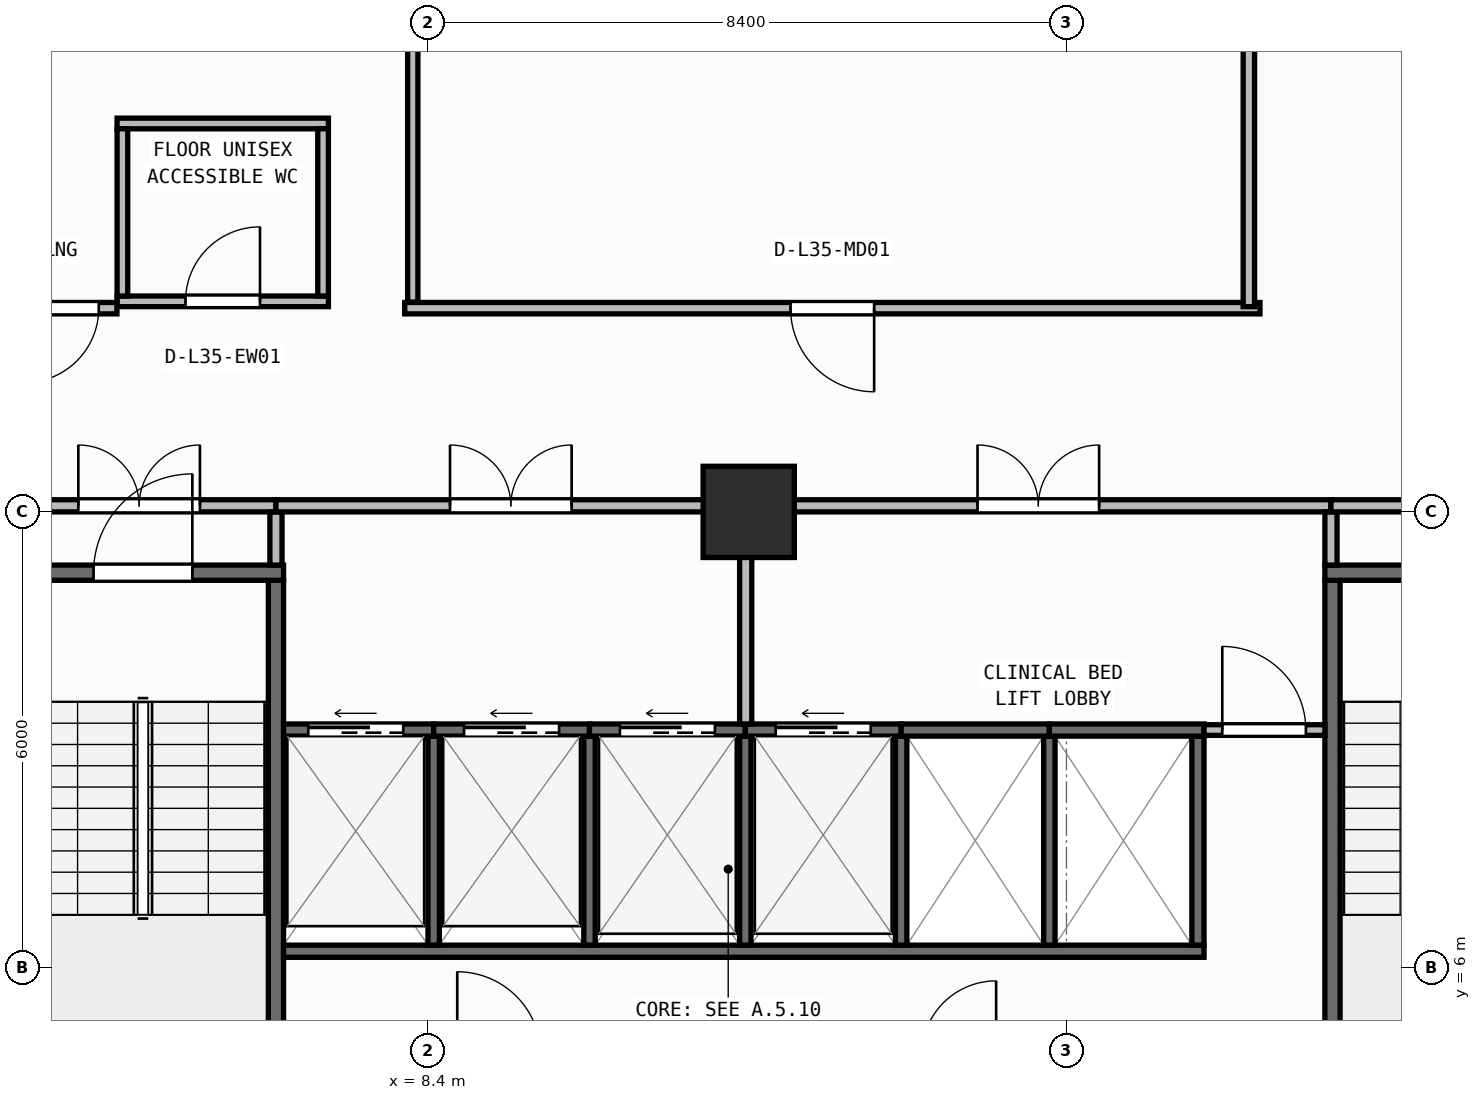
"""IFC4 building model, lengths in metres.
Left out: names, types, materials, properties, quantities, classifications, styles, units other than length and angle.
Written with IfcOpenShell. Run it as: python <this file> out.ifc"""

import sys

from ifc_helpers import new_model, si_unit, direction, frame, frame_2d, origin, origin_2d, place, context, subcontext, project, spatial, rectangle, extrude, element, fill, save


model = new_model("IFC4")
c1 = context("Model", 3, precision=1e-05, world=origin(), true_north=direction((0.0, 1.0)))
c2 = subcontext(c1, "Body", "Model", "MODEL_VIEW")
j1 = project(units=[si_unit("LENGTHUNIT", "METRE"), si_unit("PLANEANGLEUNIT", "RADIAN")], contexts=[c1])
p1 = place(None, origin())
s1 = spatial("IfcSite", under=j1, at=p1, CompositionType="ELEMENT")
p2 = place(p1, origin())
s2 = spatial("IfcBuilding", under=s1, at=p2, CompositionType="ELEMENT")
p3 = place(p2, frame((0.0, 0.0, 142.85)))
s3 = spatial("IfcBuildingStorey", under=s2, at=p3, CompositionType="ELEMENT", Elevation=142.85)
p4 = place(p3, frame((12.62, 12.0, 0.0), z_axis=(0.0, 0.0, 1.0), x_axis=(1.0, 0.0, 0.0)))
e1 = element("IfcColumn", 1, at=p4, inside=s3, PredefinedType="COLUMN", context=c2, shape_type="SweptSolid", body=[
    extrude(rectangle(XDim=1.2, YDim=1.2, at=origin_2d()), origin(), (0.0, 0.0, 1.0), 3.95),
])
p5 = place(p3, frame((6.4, 3.5, 0.0), z_axis=(0.0, 0.0, 1.0), x_axis=(0.0, 1.0, 0.0)))
e2 = element("IfcWall", 2, at=p5, inside=s3, PredefinedType="SHEAR", context=c2, shape_type="SweptSolid", body=[
    extrude(rectangle(XDim=7.6, YDim=0.2, at=frame_2d((3.8, 0.0))), origin(), (0.0, 0.0, 1.0), 3.71),
])
p6 = place(p3, frame((2.8, 11.2, 0.0), z_axis=(0.0, 0.0, 1.0), x_axis=(1.0, 0.0, 0.0)))
e3 = element("IfcWall", 3, at=p6, inside=s3, PredefinedType="SHEAR", context=c2, shape_type="SweptSolid", body=[
    extrude(rectangle(XDim=3.7, YDim=0.2, at=frame_2d((1.85, 0.0))), origin(), (0.0, 0.0, 1.0), 3.71),
])
p7 = place(p6, frame((1.2, 0.0, 0.0)))
e4 = element("IfcOpeningElement", 4, at=p7, cuts=e3, PredefinedType="OPENING", context=c2, shape_type="SweptSolid", body=[
    extrude(rectangle(XDim=1.3, YDim=2.15, at=frame_2d((0.65, 1.075))), frame((0.0, 0.11, 0.0), z_axis=(0.0, -1.0, 0.0), x_axis=(1.0, 0.0, 0.0)), (0.0, 0.0, 1.0), 0.22),
])
p8 = place(p3, frame((20.3, 3.5, 0.0), z_axis=(0.0, 0.0, 1.0), x_axis=(0.0, 1.0, 0.0)))
e5 = element("IfcWall", 5, at=p8, inside=s3, PredefinedType="SHEAR", context=c2, shape_type="SweptSolid", body=[
    extrude(rectangle(XDim=7.6, YDim=0.2, at=frame_2d((3.8, 0.0))), origin(), (0.0, 0.0, 1.0), 3.71),
])
p9 = place(p3, frame((20.2, 11.2, 0.0), z_axis=(0.0, 0.0, 1.0), x_axis=(1.0, 0.0, 0.0)))
e6 = element("IfcWall", 6, at=p9, inside=s3, PredefinedType="SHEAR", context=c2, shape_type="SweptSolid", body=[
    extrude(rectangle(XDim=3.7, YDim=0.2, at=frame_2d((1.85, 0.0))), origin(), (0.0, 0.0, 1.0), 3.71),
])
p10 = place(p9, frame((1.2, 0.0, 0.0)))
e7 = element("IfcOpeningElement", 7, at=p10, cuts=e6, PredefinedType="OPENING", context=c2, shape_type="SweptSolid", body=[
    extrude(rectangle(XDim=1.3, YDim=2.15, at=frame_2d((0.65, 1.075))), frame((0.0, 0.11, 0.0), z_axis=(0.0, -1.0, 0.0), x_axis=(1.0, 0.0, 0.0)), (0.0, 0.0, 1.0), 0.22),
])
p11 = place(p3, frame((6.5, 6.22, 0.0), z_axis=(0.0, 0.0, 1.0), x_axis=(1.0, 0.0, 0.0)))
e8 = element("IfcWall", 8, at=p11, inside=s3, PredefinedType="SHEAR", context=c2, shape_type="SweptSolid", body=[
    extrude(rectangle(XDim=12.11, YDim=0.16, at=frame_2d((6.055, 0.0))), origin(), (0.0, 0.0, 1.0), 3.71),
])
p12 = place(p3, frame((18.53, 6.3, 0.0), z_axis=(0.0, 0.0, 1.0), x_axis=(0.0, 1.0, 0.0)))
e9 = element("IfcWall", 9, at=p12, inside=s3, PredefinedType="SHEAR", context=c2, shape_type="SweptSolid", body=[
    extrude(rectangle(XDim=2.75, YDim=0.16, at=frame_2d((1.375, 0.0))), origin(), (0.0, 0.0, 1.0), 3.71),
])
for number, where, z_axis, x_axis in (
    (10, (8.475, 6.3, 0.0), (0.0, 0.0, 1.0), (0.0, 1.0, 0.0)),
    (11, (10.525, 6.3, 0.0), (0.0, 0.0, 1.0), (0.0, 1.0, 0.0)),
    (12, (12.575, 6.3, 0.0), (0.0, 0.0, 1.0), (0.0, 1.0, 0.0)),
    (13, (14.625, 6.3, 0.0), (0.0, 0.0, 1.0), (0.0, 1.0, 0.0)),
    (14, (16.575, 6.3, 0.0), (0.0, 0.0, 1.0), (0.0, 1.0, 0.0)),
):
    element("IfcWall", number, at=place(p3, frame(where, z_axis=z_axis, x_axis=x_axis)), inside=s3, PredefinedType="SHEAR", context=c2, shape_type="SweptSolid", body=[
        extrude(rectangle(XDim=2.75, YDim=0.15, at=frame_2d((1.375, 0.0))), origin(), (0.0, 0.0, 1.0), 3.71),
    ])
p13 = place(p3, frame((6.5, 9.13, 0.0), z_axis=(0.0, 0.0, 1.0), x_axis=(1.0, 0.0, 0.0)))
e15 = element("IfcWall", 15, at=p13, inside=s3, PredefinedType="SHEAR", context=c2, shape_type="SweptSolid", body=[
    extrude(rectangle(XDim=1.975, YDim=0.16, at=frame_2d((0.988, 0.0))), origin(), (0.0, 0.0, 1.0), 3.71),
])
p14 = place(p13, frame((0.325, 0.0, 0.0)))
e16 = element("IfcOpeningElement", 16, at=p14, cuts=e15, PredefinedType="OPENING", context=c2, shape_type="SweptSolid", body=[
    extrude(rectangle(XDim=1.25, YDim=2.15, at=frame_2d((0.625, 1.075))), frame((0.0, 0.09, 0.0), z_axis=(0.0, -1.0, 0.0), x_axis=(1.0, 0.0, 0.0)), (0.0, 0.0, 1.0), 0.18),
])
p15 = place(p3, frame((8.475, 9.13, 0.0), z_axis=(0.0, 0.0, 1.0), x_axis=(1.0, 0.0, 0.0)))
e17 = element("IfcWall", 17, at=p15, inside=s3, PredefinedType="SHEAR", context=c2, shape_type="SweptSolid", body=[
    extrude(rectangle(XDim=2.05, YDim=0.16, at=frame_2d((1.025, 0.0))), origin(), (0.0, 0.0, 1.0), 3.71),
])
p16 = place(p15, frame((0.4, 0.0, 0.0)))
e18 = element("IfcOpeningElement", 18, at=p16, cuts=e17, PredefinedType="OPENING", context=c2, shape_type="SweptSolid", body=[
    extrude(rectangle(XDim=1.25, YDim=2.15, at=frame_2d((0.625, 1.075))), frame((0.0, 0.09, 0.0), z_axis=(0.0, -1.0, 0.0), x_axis=(1.0, 0.0, 0.0)), (0.0, 0.0, 1.0), 0.18),
])
p17 = place(p3, frame((10.525, 9.13, 0.0), z_axis=(0.0, 0.0, 1.0), x_axis=(1.0, 0.0, 0.0)))
e19 = element("IfcWall", 19, at=p17, inside=s3, PredefinedType="SHEAR", context=c2, shape_type="SweptSolid", body=[
    extrude(rectangle(XDim=2.05, YDim=0.16, at=frame_2d((1.025, 0.0))), origin(), (0.0, 0.0, 1.0), 3.71),
])
p18 = place(p17, frame((0.4, 0.0, 0.0)))
e20 = element("IfcOpeningElement", 20, at=p18, cuts=e19, PredefinedType="OPENING", context=c2, shape_type="SweptSolid", body=[
    extrude(rectangle(XDim=1.25, YDim=2.15, at=frame_2d((0.625, 1.075))), frame((0.0, 0.09, 0.0), z_axis=(0.0, -1.0, 0.0), x_axis=(1.0, 0.0, 0.0)), (0.0, 0.0, 1.0), 0.18),
])
p19 = place(p3, frame((12.575, 9.13, 0.0), z_axis=(0.0, 0.0, 1.0), x_axis=(1.0, 0.0, 0.0)))
e21 = element("IfcWall", 21, at=p19, inside=s3, PredefinedType="SHEAR", context=c2, shape_type="SweptSolid", body=[
    extrude(rectangle(XDim=2.05, YDim=0.16, at=frame_2d((1.025, 0.0))), origin(), (0.0, 0.0, 1.0), 3.71),
])
p20 = place(p19, frame((0.4, 0.0, 0.0)))
e22 = element("IfcOpeningElement", 22, at=p20, cuts=e21, PredefinedType="OPENING", context=c2, shape_type="SweptSolid", body=[
    extrude(rectangle(XDim=1.25, YDim=2.15, at=frame_2d((0.625, 1.075))), frame((0.0, 0.09, 0.0), z_axis=(0.0, -1.0, 0.0), x_axis=(1.0, 0.0, 0.0)), (0.0, 0.0, 1.0), 0.18),
])
p21 = place(p3, frame((14.625, 9.13, 0.0), z_axis=(0.0, 0.0, 1.0), x_axis=(1.0, 0.0, 0.0)))
e23 = element("IfcWall", 23, at=p21, inside=s3, PredefinedType="SHEAR", context=c2, shape_type="SweptSolid", body=[
    extrude(rectangle(XDim=1.95, YDim=0.16, at=frame_2d((0.975, 0.0))), origin(), (0.0, 0.0, 1.0), 3.71),
])
p22 = place(p3, frame((16.575, 9.13, 0.0), z_axis=(0.0, 0.0, 1.0), x_axis=(1.0, 0.0, 0.0)))
e24 = element("IfcWall", 24, at=p22, inside=s3, PredefinedType="SHEAR", context=c2, shape_type="SweptSolid", body=[
    extrude(rectangle(XDim=2.035, YDim=0.16, at=frame_2d((1.018, 0.0))), origin(), (0.0, 0.0, 1.0), 3.71),
])
p23 = place(p3, frame((18.61, 9.13, 0.0), z_axis=(0.0, 0.0, 1.0), x_axis=(1.0, 0.0, 0.0)))
e25 = element("IfcWall", 25, at=p23, inside=s3, PredefinedType="PARTITIONING", context=c2, shape_type="SweptSolid", body=[
    extrude(rectangle(XDim=1.59, YDim=0.14, at=frame_2d((0.795, 0.0))), origin(), (0.0, 0.0, 1.0), 3.71),
])
p24 = place(p23, frame((0.24, 0.0, 0.0)))
e26 = element("IfcOpeningElement", 26, at=p24, cuts=e25, PredefinedType="OPENING", context=c2, shape_type="SweptSolid", body=[
    extrude(rectangle(XDim=1.1, YDim=2.1, at=frame_2d((0.55, 1.05))), frame((0.0, 0.08, 0.0), z_axis=(0.0, -1.0, 0.0), x_axis=(1.0, 0.0, 0.0)), (0.0, 0.0, 1.0), 0.16),
])
p25 = place(p3, frame((2.8, 12.08, 0.0), z_axis=(0.0, 0.0, 1.0), x_axis=(1.0, 0.0, 0.0)))
e27 = element("IfcWall", 27, at=p25, inside=s3, PredefinedType="PARTITIONING", context=c2, shape_type="SweptSolid", body=[
    extrude(rectangle(XDim=3.6, YDim=0.16, at=frame_2d((1.8, 0.0))), origin(), (0.0, 0.0, 1.0), 3.083),
])
p26 = place(p25, frame((1.0, 0.0, 0.0)))
e28 = element("IfcOpeningElement", 28, at=p26, cuts=e27, PredefinedType="OPENING", context=c2, shape_type="SweptSolid", body=[
    extrude(rectangle(XDim=1.6, YDim=2.05, at=frame_2d((0.8, 1.025))), frame((0.0, 0.09, 0.0), z_axis=(0.0, -1.0, 0.0), x_axis=(1.0, 0.0, 0.0)), (0.0, 0.0, 1.0), 0.18),
])
p27 = place(p3, frame((6.4, 11.3, 0.0), z_axis=(0.0, 0.0, 1.0), x_axis=(0.0, 1.0, 0.0)))
e29 = element("IfcWall", 29, at=p27, inside=s3, PredefinedType="PARTITIONING", context=c2, shape_type="SweptSolid", body=[
    extrude(rectangle(XDim=0.7, YDim=0.16, at=frame_2d((0.35, 0.0))), origin(), (0.0, 0.0, 1.0), 3.71),
])
p28 = place(p3, frame((6.4, 12.08, 0.0), z_axis=(0.0, 0.0, 1.0), x_axis=(1.0, 0.0, 0.0)))
e30 = element("IfcWall", 30, at=p28, inside=s3, PredefinedType="PARTITIONING", context=c2, shape_type="SweptSolid", body=[
    extrude(rectangle(XDim=6.18, YDim=0.16, at=frame_2d((3.09, 0.0))), origin(), (0.0, 0.0, 1.0), 3.083),
])
p29 = place(p28, frame((2.29, 0.0, 0.0)))
e31 = element("IfcOpeningElement", 31, at=p29, cuts=e30, PredefinedType="OPENING", context=c2, shape_type="SweptSolid", body=[
    extrude(rectangle(XDim=1.6, YDim=2.05, at=frame_2d((0.8, 1.025))), frame((0.0, 0.09, 0.0), z_axis=(0.0, -1.0, 0.0), x_axis=(1.0, 0.0, 0.0)), (0.0, 0.0, 1.0), 0.18),
])
p30 = place(p3, frame((12.58, 9.21, 0.0), z_axis=(0.0, 0.0, 1.0), x_axis=(0.0, 1.0, 0.0)))
e32 = element("IfcWall", 32, at=p30, inside=s3, PredefinedType="PARTITIONING", context=c2, shape_type="SweptSolid", body=[
    extrude(rectangle(XDim=2.79, YDim=0.16, at=frame_2d((1.395, 0.0))), origin(), (0.0, 0.0, 1.0), 3.71),
])
p31 = place(p3, frame((12.58, 12.08, 0.0), z_axis=(0.0, 0.0, 1.0), x_axis=(1.0, 0.0, 0.0)))
e33 = element("IfcWall", 33, at=p31, inside=s3, PredefinedType="PARTITIONING", context=c2, shape_type="SweptSolid", body=[
    extrude(rectangle(XDim=7.7, YDim=0.16, at=frame_2d((3.85, 0.0))), origin(), (0.0, 0.0, 1.0), 3.083),
])
p32 = place(p31, frame((3.05, 0.0, 0.0)))
e34 = element("IfcOpeningElement", 34, at=p32, cuts=e33, PredefinedType="OPENING", context=c2, shape_type="SweptSolid", body=[
    extrude(rectangle(XDim=1.6, YDim=2.05, at=frame_2d((0.8, 1.025))), frame((0.0, 0.09, 0.0), z_axis=(0.0, -1.0, 0.0), x_axis=(1.0, 0.0, 0.0)), (0.0, 0.0, 1.0), 0.18),
])
p33 = place(p3, frame((20.28, 11.3, 0.0), z_axis=(0.0, 0.0, 1.0), x_axis=(0.0, 1.0, 0.0)))
e35 = element("IfcWall", 35, at=p33, inside=s3, PredefinedType="PARTITIONING", context=c2, shape_type="SweptSolid", body=[
    extrude(rectangle(XDim=0.7, YDim=0.16, at=frame_2d((0.35, 0.0))), origin(), (0.0, 0.0, 1.0), 3.71),
])
p34 = place(p3, frame((20.28, 12.08, 0.0), z_axis=(0.0, 0.0, 1.0), x_axis=(1.0, 0.0, 0.0)))
e36 = element("IfcWall", 36, at=p34, inside=s3, PredefinedType="PARTITIONING", context=c2, shape_type="SweptSolid", body=[
    extrude(rectangle(XDim=3.62, YDim=0.16, at=frame_2d((1.81, 0.0))), origin(), (0.0, 0.0, 1.0), 3.083),
])
p35 = place(p34, frame((1.01, 0.0, 0.0)))
e37 = element("IfcOpeningElement", 37, at=p35, cuts=e36, PredefinedType="OPENING", context=c2, shape_type="SweptSolid", body=[
    extrude(rectangle(XDim=1.6, YDim=2.05, at=frame_2d((0.8, 1.025))), frame((0.0, 0.09, 0.0), z_axis=(0.0, -1.0, 0.0), x_axis=(1.0, 0.0, 0.0)), (0.0, 0.0, 1.0), 0.18),
])
p36 = place(p3, frame((4.31, 14.77, 0.0), z_axis=(0.0, 0.0, 1.0), x_axis=(1.0, 0.0, 0.0)))
e38 = element("IfcWall", 38, at=p36, inside=s3, PredefinedType="PARTITIONING", context=c2, shape_type="SweptSolid", body=[
    extrude(rectangle(XDim=2.78, YDim=0.14, at=frame_2d((1.39, 0.0))), origin(), (0.0, 0.0, 1.0), 3.71),
])
p37 = place(p36, frame((0.9, 0.0, 0.0)))
e39 = element("IfcOpeningElement", 39, at=p37, cuts=e38, PredefinedType="OPENING", context=c2, shape_type="SweptSolid", body=[
    extrude(rectangle(XDim=0.98, YDim=2.1, at=frame_2d((0.49, 1.05))), frame((0.0, 0.08, 0.0), z_axis=(0.0, -1.0, 0.0), x_axis=(1.0, 0.0, 0.0)), (0.0, 0.0, 1.0), 0.16),
])
p38 = place(p3, frame((4.31, 17.11, 0.0), z_axis=(0.0, 0.0, 1.0), x_axis=(1.0, 0.0, 0.0)))
e40 = element("IfcWall", 40, at=p38, inside=s3, PredefinedType="PARTITIONING", context=c2, shape_type="SweptSolid", body=[
    extrude(rectangle(XDim=2.78, YDim=0.14, at=frame_2d((1.39, 0.0))), origin(), (0.0, 0.0, 1.0), 3.71),
])
for number, where, z_axis, x_axis in (
    (41, (4.38, 14.84, 0.0), (0.0, 0.0, 1.0), (0.0, 1.0, 0.0)),
    (42, (7.02, 14.84, 0.0), (0.0, 0.0, 1.0), (0.0, 1.0, 0.0)),
):
    element("IfcWall", number, at=place(p3, frame(where, z_axis=z_axis, x_axis=x_axis)), inside=s3, PredefinedType="PARTITIONING", context=c2, shape_type="SweptSolid", body=[
        extrude(rectangle(XDim=2.2, YDim=0.14, at=frame_2d((1.1, 0.0))), origin(), (0.0, 0.0, 1.0), 3.71),
    ])
p39 = place(p3, frame((4.308, 14.68, 0.0), z_axis=(0.0, 0.0, 1.0), x_axis=(-1.0, 0.0, 0.0)))
e43 = element("IfcWall", 43, at=p39, inside=s3, PredefinedType="PARTITIONING", context=c2, shape_type="SweptSolid", body=[
    extrude(rectangle(XDim=1.458, YDim=0.15, at=frame_2d((0.729, 0.0))), origin(), (0.0, 0.0, 1.0), 3.71),
])
p40 = place(p39, frame((0.239, 0.0, 0.0)))
e44 = element("IfcOpeningElement", 44, at=p40, cuts=e43, PredefinedType="OPENING", context=c2, shape_type="SweptSolid", body=[
    extrude(rectangle(XDim=0.98, YDim=2.1, at=frame_2d((0.49, 1.05))), frame((0.0, 0.085, 0.0), z_axis=(0.0, -1.0, 0.0), x_axis=(1.0, 0.0, 0.0)), (0.0, 0.0, 1.0), 0.17),
])
p41 = place(p3, frame((19.346, 14.68, 0.0), z_axis=(0.0, 0.0, 1.0), x_axis=(-1.0, 0.0, 0.0)))
e45 = element("IfcWall", 45, at=p41, inside=s3, PredefinedType="PARTITIONING", context=c2, shape_type="SweptSolid", body=[
    extrude(rectangle(XDim=11.252, YDim=0.15, at=frame_2d((5.626, 0.0))), origin(), (0.0, 0.0, 1.0), 3.71),
])
p42 = place(p41, frame((5.076, 0.0, 0.0)))
e46 = element("IfcOpeningElement", 46, at=p42, cuts=e45, PredefinedType="OPENING", context=c2, shape_type="SweptSolid", body=[
    extrude(rectangle(XDim=1.1, YDim=2.1, at=frame_2d((0.55, 1.05))), frame((0.0, 0.085, 0.0), z_axis=(0.0, -1.0, 0.0), x_axis=(1.0, 0.0, 0.0)), (0.0, 0.0, 1.0), 0.17),
])
p43 = place(p3, frame((19.2, 27.26, 0.0), z_axis=(0.0, 0.0, 1.0), x_axis=(0.0, -1.0, 0.0)))
e47 = element("IfcWall", 47, at=p43, inside=s3, PredefinedType="PARTITIONING", context=c2, shape_type="SweptSolid", body=[
    extrude(rectangle(XDim=12.56, YDim=0.15, at=frame_2d((6.28, 0.0))), origin(), (0.0, 0.0, 1.0), 3.71),
])
p44 = place(p3, frame((8.2, 14.76, 0.0), z_axis=(0.0, 0.0, 1.0), x_axis=(0.0, 1.0, 0.0)))
e48 = element("IfcWall", 48, at=p44, inside=s3, PredefinedType="PARTITIONING", context=c2, shape_type="SweptSolid", body=[
    extrude(rectangle(XDim=12.34, YDim=0.135, at=frame_2d((6.17, 0.0))), origin(), (0.0, 0.0, 1.0), 3.152),
])
p45 = place(p7, origin())
e49 = element("IfcDoor", 49, at=p45, inside=s3, OperationType="SINGLE_SWING_RIGHT", PredefinedType="DOOR", context=c2, shape_type="SweptSolid", body=[
    extrude(rectangle(XDim=1.3, YDim=2.15, at=frame_2d((0.65, 1.075))), frame((0.0, 0.025, 0.0), z_axis=(0.0, -1.0, 0.0), x_axis=(1.0, 0.0, 0.0)), (0.0, 0.0, 1.0), 0.05),
])
fill(e4, e49)
p46 = place(p14, origin())
e50 = element("IfcDoor", 50, at=p46, inside=s3, OperationType="SLIDING_TO_LEFT", PredefinedType="DOOR", context=c2, shape_type="SweptSolid", body=[
    extrude(rectangle(XDim=1.25, YDim=2.15, at=frame_2d((0.625, 1.075))), frame((0.0, 0.025, 0.0), z_axis=(0.0, -1.0, 0.0), x_axis=(1.0, 0.0, 0.0)), (0.0, 0.0, 1.0), 0.05),
])
fill(e16, e50)
p47 = place(p16, origin())
e51 = element("IfcDoor", 51, at=p47, inside=s3, OperationType="SLIDING_TO_LEFT", PredefinedType="DOOR", context=c2, shape_type="SweptSolid", body=[
    extrude(rectangle(XDim=1.25, YDim=2.15, at=frame_2d((0.625, 1.075))), frame((0.0, 0.025, 0.0), z_axis=(0.0, -1.0, 0.0), x_axis=(1.0, 0.0, 0.0)), (0.0, 0.0, 1.0), 0.05),
])
fill(e18, e51)
p48 = place(p18, origin())
e52 = element("IfcDoor", 52, at=p48, inside=s3, OperationType="SLIDING_TO_LEFT", PredefinedType="DOOR", context=c2, shape_type="SweptSolid", body=[
    extrude(rectangle(XDim=1.25, YDim=2.15, at=frame_2d((0.625, 1.075))), frame((0.0, 0.025, 0.0), z_axis=(0.0, -1.0, 0.0), x_axis=(1.0, 0.0, 0.0)), (0.0, 0.0, 1.0), 0.05),
])
fill(e20, e52)
p49 = place(p20, origin())
e53 = element("IfcDoor", 53, at=p49, inside=s3, OperationType="SLIDING_TO_LEFT", PredefinedType="DOOR", context=c2, shape_type="SweptSolid", body=[
    extrude(rectangle(XDim=1.25, YDim=2.15, at=frame_2d((0.625, 1.075))), frame((0.0, 0.025, 0.0), z_axis=(0.0, -1.0, 0.0), x_axis=(1.0, 0.0, 0.0)), (0.0, 0.0, 1.0), 0.05),
])
fill(e22, e53)
p50 = place(p24, origin())
e54 = element("IfcDoor", 54, at=p50, inside=s3, OperationType="SINGLE_SWING_LEFT", PredefinedType="DOOR", context=c2, shape_type="SweptSolid", body=[
    extrude(rectangle(XDim=1.1, YDim=2.1, at=frame_2d((0.55, 1.05))), frame((0.0, 0.025, 0.0), z_axis=(0.0, -1.0, 0.0), x_axis=(1.0, 0.0, 0.0)), (0.0, 0.0, 1.0), 0.05),
])
fill(e26, e54)
p51 = place(p26, origin())
e55 = element("IfcDoor", 55, at=p51, inside=s3, OperationType="DOUBLE_DOOR_SINGLE_SWING", PredefinedType="DOOR", context=c2, shape_type="SweptSolid", body=[
    extrude(rectangle(XDim=1.6, YDim=2.05, at=frame_2d((0.8, 1.025))), frame((0.0, 0.025, 0.0), z_axis=(0.0, -1.0, 0.0), x_axis=(1.0, 0.0, 0.0)), (0.0, 0.0, 1.0), 0.05),
])
fill(e28, e55)
p52 = place(p29, origin())
e56 = element("IfcDoor", 56, at=p52, inside=s3, OperationType="DOUBLE_DOOR_SINGLE_SWING", PredefinedType="DOOR", context=c2, shape_type="SweptSolid", body=[
    extrude(rectangle(XDim=1.6, YDim=2.05, at=frame_2d((0.8, 1.025))), frame((0.0, 0.025, 0.0), z_axis=(0.0, -1.0, 0.0), x_axis=(1.0, 0.0, 0.0)), (0.0, 0.0, 1.0), 0.05),
])
fill(e31, e56)
p53 = place(p32, origin())
e57 = element("IfcDoor", 57, at=p53, inside=s3, OperationType="DOUBLE_DOOR_SINGLE_SWING", PredefinedType="DOOR", context=c2, shape_type="SweptSolid", body=[
    extrude(rectangle(XDim=1.6, YDim=2.05, at=frame_2d((0.8, 1.025))), frame((0.0, 0.025, 0.0), z_axis=(0.0, -1.0, 0.0), x_axis=(1.0, 0.0, 0.0)), (0.0, 0.0, 1.0), 0.05),
])
fill(e34, e57)
p54 = place(p37, origin())
e58 = element("IfcDoor", 58, at=p54, inside=s3, OperationType="SINGLE_SWING_RIGHT", PredefinedType="DOOR", context=c2, shape_type="SweptSolid", body=[
    extrude(rectangle(XDim=0.98, YDim=2.1, at=frame_2d((0.49, 1.05))), frame((0.0, 0.025, 0.0), z_axis=(0.0, -1.0, 0.0), x_axis=(1.0, 0.0, 0.0)), (0.0, 0.0, 1.0), 0.05),
])
fill(e39, e58)
p55 = place(p40, origin())
e59 = element("IfcDoor", 59, at=p55, inside=s3, OperationType="SINGLE_SWING_RIGHT", PredefinedType="DOOR", context=c2, shape_type="SweptSolid", body=[
    extrude(rectangle(XDim=0.98, YDim=2.1, at=frame_2d((0.49, 1.05))), frame((0.0, 0.025, 0.0), z_axis=(0.0, -1.0, 0.0), x_axis=(1.0, 0.0, 0.0)), (0.0, 0.0, 1.0), 0.05),
])
fill(e44, e59)
p56 = place(p42, origin())
e60 = element("IfcDoor", 60, at=p56, inside=s3, OperationType="SINGLE_SWING_LEFT", PredefinedType="DOOR", context=c2, shape_type="SweptSolid", body=[
    extrude(rectangle(XDim=1.1, YDim=2.1, at=frame_2d((0.55, 1.05))), frame((0.0, 0.025, 0.0), z_axis=(0.0, -1.0, 0.0), x_axis=(1.0, 0.0, 0.0)), (0.0, 0.0, 1.0), 0.05),
])
fill(e46, e60)
save(model, sys.argv[1])
